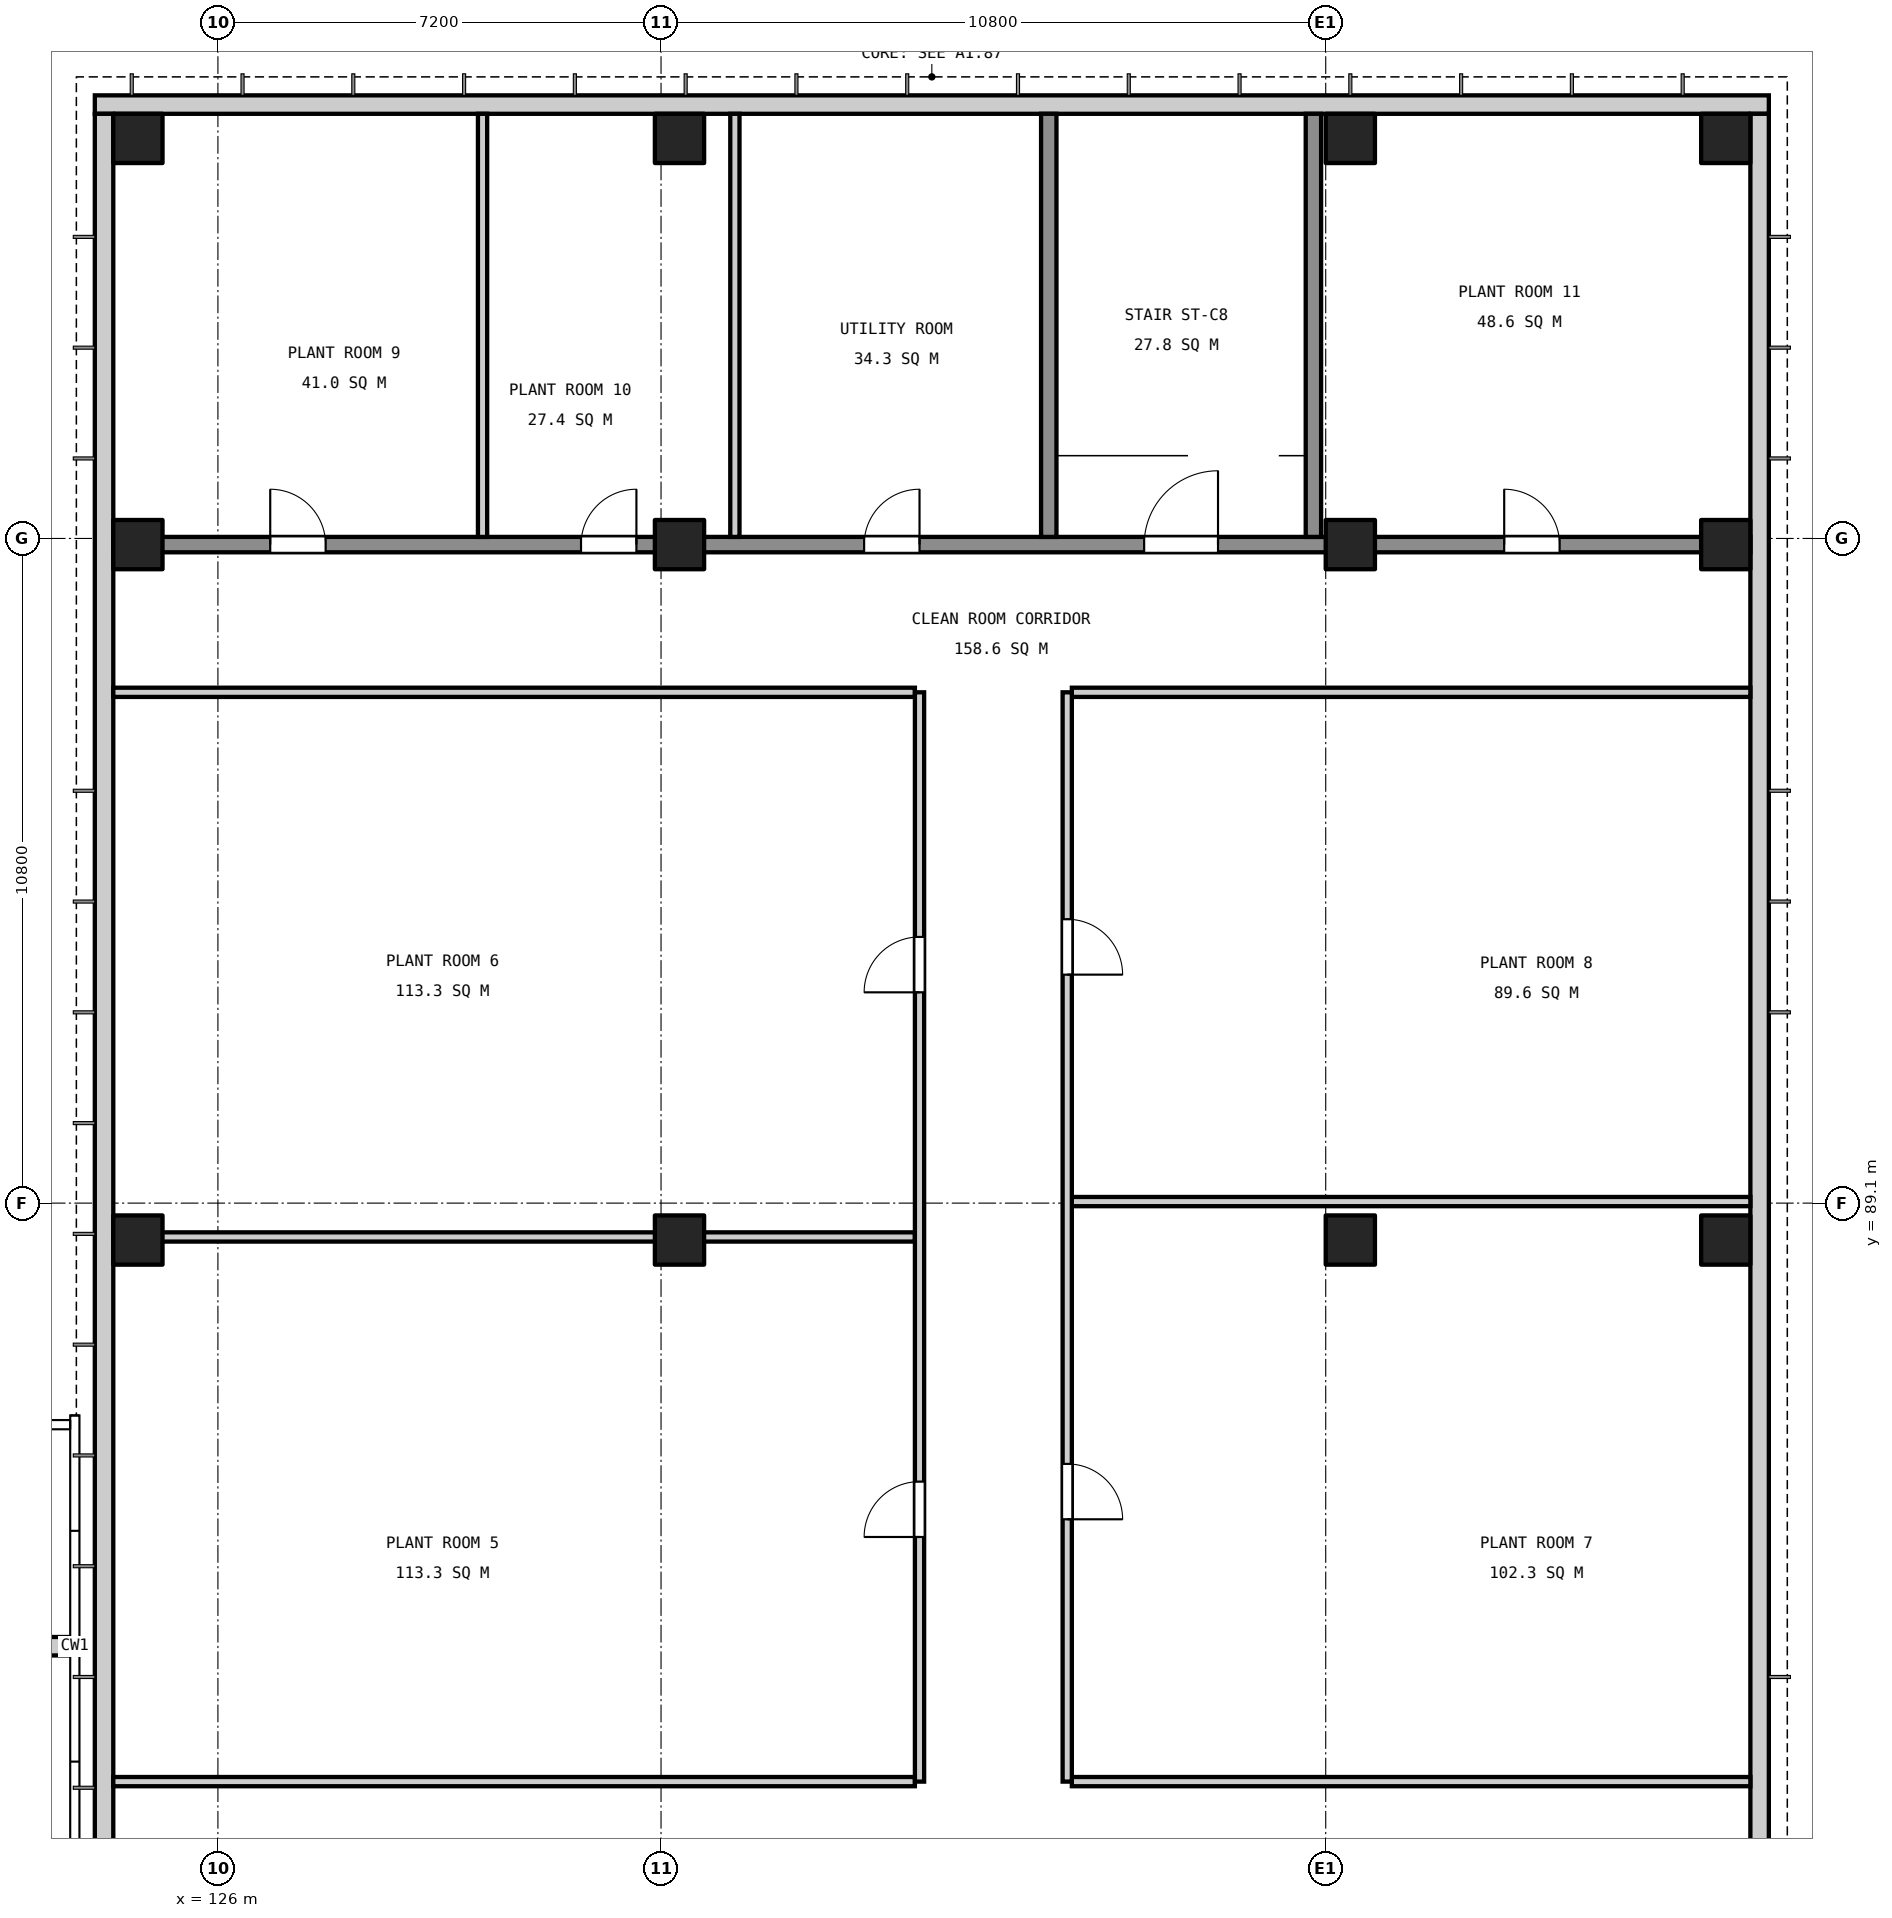
"""IFC4 building model, lengths in metres.
Left out: names, types, materials, properties, quantities, classifications, styles, units other than length and angle.
Written with IfcOpenShell. Run it as: python <this file> out.ifc"""

import sys

from ifc_helpers import new_model, si_unit, direction, frame, frame_2d, origin, origin_2d, place, context, subcontext, project, spatial, rectangle, extrude, element, fill, save


model = new_model("IFC4")
c1 = context("Model", 3, precision=1e-05, world=origin(), true_north=direction((0.0, 1.0)))
c2 = subcontext(c1, "Body", "Model", "MODEL_VIEW")
j1 = project(units=[si_unit("LENGTHUNIT", "METRE"), si_unit("PLANEANGLEUNIT", "RADIAN")], contexts=[c1])
p1 = place(None, origin())
s1 = spatial("IfcSite", under=j1, at=p1, CompositionType="ELEMENT")
p2 = place(p1, origin())
s2 = spatial("IfcBuilding", under=s1, at=p2, CompositionType="ELEMENT")
p3 = place(p2, frame((0.0, 0.0, 22.2)))
s3 = spatial("IfcBuildingStorey", under=s2, at=p3, CompositionType="ELEMENT", Elevation=22.2)
for number, where, z_axis, x_axis in (
    (1, (124.7, 88.5, 0.0), (0.0, 0.0, 1.0), (1.0, 0.0, 0.0)),
    (2, (124.7, 99.8, 0.0), (0.0, 0.0, 1.0), (1.0, 0.0, 0.0)),
    (3, (124.7, 106.4, 0.0), (0.0, 0.0, 1.0), (1.0, 0.0, 0.0)),
    (4, (133.5, 88.5, 0.0), (0.0, 0.0, 1.0), (1.0, 0.0, 0.0)),
    (5, (133.5, 99.8, 0.0), (0.0, 0.0, 1.0), (1.0, 0.0, 0.0)),
    (6, (133.5, 106.4, 0.0), (0.0, 0.0, 1.0), (1.0, 0.0, 0.0)),
    (7, (144.4, 88.5, 0.0), (0.0, 0.0, 1.0), (1.0, 0.0, 0.0)),
    (8, (144.4, 99.8, 0.0), (0.0, 0.0, 1.0), (1.0, 0.0, 0.0)),
    (9, (144.4, 106.4, 0.0), (0.0, 0.0, 1.0), (1.0, 0.0, 0.0)),
    (10, (150.5, 88.5, 0.0), (0.0, 0.0, 1.0), (1.0, 0.0, 0.0)),
    (11, (150.5, 99.8, 0.0), (0.0, 0.0, 1.0), (1.0, 0.0, 0.0)),
    (12, (150.5, 106.4, 0.0), (0.0, 0.0, 1.0), (1.0, 0.0, 0.0)),
):
    element("IfcColumn", number, at=place(p3, frame(where, z_axis=z_axis, x_axis=x_axis)), inside=s3, PredefinedType="COLUMN", context=c2, shape_type="SweptSolid", body=[
        extrude(rectangle(XDim=0.8, YDim=0.8, at=origin_2d()), origin(), (0.0, 0.0, 1.0), 4.8),
    ])
p4 = place(p3, frame((124.0, 106.95, 0.0), z_axis=(0.0, 0.0, 1.0), x_axis=(1.0, 0.0, 0.0)))
e13 = element("IfcWall", 13, at=p4, inside=s3, PredefinedType="SOLIDWALL", context=c2, shape_type="SweptSolid", body=[
    extrude(rectangle(XDim=27.2, YDim=0.3, at=frame_2d((13.6, 0.0))), origin(), (0.0, 0.0, 1.0), 4.35),
])
for number, where, z_axis, x_axis in (
    (14, (124.15, 70.3, 0.0), (0.0, 0.0, 1.0), (0.0, 1.0, 0.0)),
    (15, (151.05, 70.3, 0.0), (0.0, 0.0, 1.0), (0.0, 1.0, 0.0)),
):
    element("IfcWall", number, at=place(p3, frame(where, z_axis=z_axis, x_axis=x_axis)), inside=s3, PredefinedType="SOLIDWALL", context=c2, shape_type="SweptSolid", body=[
        extrude(rectangle(XDim=36.5, YDim=0.3, at=frame_2d((18.25, 0.0))), origin(), (0.0, 0.0, 1.0), 4.35),
    ])
p5 = place(p3, frame((124.3, 79.7, 0.0), z_axis=(0.0, 0.0, 1.0), x_axis=(1.0, 0.0, 0.0)))
e16 = element("IfcWall", 16, at=p5, inside=s3, PredefinedType="SOLIDWALL", context=c2, shape_type="SweptSolid", body=[
    extrude(rectangle(XDim=13.025, YDim=0.15, at=frame_2d((6.512, 0.0))), origin(), (0.0, 0.0, 1.0), 4.35),
])
p6 = place(p3, frame((139.875, 79.7, 0.0), z_axis=(0.0, 0.0, 1.0), x_axis=(1.0, 0.0, 0.0)))
e17 = element("IfcWall", 17, at=p6, inside=s3, PredefinedType="SOLIDWALL", context=c2, shape_type="SweptSolid", body=[
    extrude(rectangle(XDim=11.025, YDim=0.15, at=frame_2d((5.512, 0.0))), origin(), (0.0, 0.0, 1.0), 4.35),
])
p7 = place(p3, frame((124.3, 88.55, 0.0), z_axis=(0.0, 0.0, 1.0), x_axis=(1.0, 0.0, 0.0)))
e18 = element("IfcWall", 18, at=p7, inside=s3, PredefinedType="SOLIDWALL", context=c2, shape_type="SweptSolid", body=[
    extrude(rectangle(XDim=13.025, YDim=0.15, at=frame_2d((6.512, 0.0))), origin(), (0.0, 0.0, 1.0), 4.35),
])
p8 = place(p3, frame((139.875, 89.125, 0.0), z_axis=(0.0, 0.0, 1.0), x_axis=(1.0, 0.0, 0.0)))
e19 = element("IfcWall", 19, at=p8, inside=s3, PredefinedType="SOLIDWALL", context=c2, shape_type="SweptSolid", body=[
    extrude(rectangle(XDim=11.025, YDim=0.15, at=frame_2d((5.512, 0.0))), origin(), (0.0, 0.0, 1.0), 4.35),
])
p9 = place(p3, frame((124.3, 97.4, 0.0), z_axis=(0.0, 0.0, 1.0), x_axis=(1.0, 0.0, 0.0)))
e20 = element("IfcWall", 20, at=p9, inside=s3, PredefinedType="SOLIDWALL", context=c2, shape_type="SweptSolid", body=[
    extrude(rectangle(XDim=13.025, YDim=0.15, at=frame_2d((6.512, 0.0))), origin(), (0.0, 0.0, 1.0), 4.35),
])
p10 = place(p3, frame((139.875, 97.4, 0.0), z_axis=(0.0, 0.0, 1.0), x_axis=(1.0, 0.0, 0.0)))
e21 = element("IfcWall", 21, at=p10, inside=s3, PredefinedType="SOLIDWALL", context=c2, shape_type="SweptSolid", body=[
    extrude(rectangle(XDim=11.025, YDim=0.15, at=frame_2d((5.512, 0.0))), origin(), (0.0, 0.0, 1.0), 4.35),
])
p11 = place(p3, frame((124.3, 99.8, 0.0), z_axis=(0.0, 0.0, 1.0), x_axis=(1.0, 0.0, 0.0)))
e22 = element("IfcWall", 22, at=p11, inside=s3, PredefinedType="SOLIDWALL", context=c2, shape_type="SweptSolid", body=[
    extrude(rectangle(XDim=26.6, YDim=0.25, at=frame_2d((13.3, 0.0))), origin(), (0.0, 0.0, 1.0), 4.35),
])
p12 = place(p11, frame((2.55, 0.0, 0.0)))
e23 = element("IfcOpeningElement", 23, at=p12, cuts=e22, PredefinedType="OPENING", context=c2, shape_type="SweptSolid", body=[
    extrude(rectangle(XDim=0.9, YDim=2.1, at=frame_2d((0.45, 1.05))), frame((0.0, 0.135, 0.0), z_axis=(0.0, -1.0, 0.0), x_axis=(1.0, 0.0, 0.0)), (0.0, 0.0, 1.0), 0.27),
])
p13 = place(p11, frame((7.6, 0.0, 0.0)))
e24 = element("IfcOpeningElement", 24, at=p13, cuts=e22, PredefinedType="OPENING", context=c2, shape_type="SweptSolid", body=[
    extrude(rectangle(XDim=0.9, YDim=2.1, at=frame_2d((0.45, 1.05))), frame((0.0, 0.135, 0.0), z_axis=(0.0, -1.0, 0.0), x_axis=(1.0, 0.0, 0.0)), (0.0, 0.0, 1.0), 0.27),
])
p14 = place(p11, frame((22.6, 0.0, 0.0)))
e25 = element("IfcOpeningElement", 25, at=p14, cuts=e22, PredefinedType="OPENING", context=c2, shape_type="SweptSolid", body=[
    extrude(rectangle(XDim=0.9, YDim=2.1, at=frame_2d((0.45, 1.05))), frame((0.0, 0.135, 0.0), z_axis=(0.0, -1.0, 0.0), x_axis=(1.0, 0.0, 0.0)), (0.0, 0.0, 1.0), 0.27),
])
p15 = place(p11, frame((12.2, 0.0, 0.0)))
e26 = element("IfcOpeningElement", 26, at=p15, cuts=e22, PredefinedType="OPENING", context=c2, shape_type="SweptSolid", body=[
    extrude(rectangle(XDim=0.9, YDim=2.1, at=frame_2d((0.45, 1.05))), frame((0.0, 0.135, 0.0), z_axis=(0.0, -1.0, 0.0), x_axis=(1.0, 0.0, 0.0)), (0.0, 0.0, 1.0), 0.27),
])
p16 = place(p11, frame((16.75, 0.0, 0.0)))
e27 = element("IfcOpeningElement", 27, at=p16, cuts=e22, PredefinedType="OPENING", context=c2, shape_type="SweptSolid", body=[
    extrude(rectangle(XDim=1.2, YDim=2.1, at=frame_2d((0.6, 1.05))), frame((0.0, 0.135, 0.0), z_axis=(0.0, -1.0, 0.0), x_axis=(1.0, 0.0, 0.0)), (0.0, 0.0, 1.0), 0.27),
])
for number, where, z_axis, x_axis in (
    (28, (130.3, 99.925, 0.0), (0.0, 0.0, 1.0), (0.0, 1.0, 0.0)),
    (29, (134.4, 99.925, 0.0), (0.0, 0.0, 1.0), (0.0, 1.0, 0.0)),
):
    element("IfcWall", number, at=place(p3, frame(where, z_axis=z_axis, x_axis=x_axis)), inside=s3, PredefinedType="SOLIDWALL", context=c2, shape_type="SweptSolid", body=[
        extrude(rectangle(XDim=6.875, YDim=0.15, at=frame_2d((3.438, 0.0))), origin(), (0.0, 0.0, 1.0), 4.35),
    ])
p17 = place(p3, frame((137.4, 79.7, 0.0), z_axis=(0.0, 0.0, 1.0), x_axis=(0.0, 1.0, 0.0)))
e30 = element("IfcWall", 30, at=p17, inside=s3, PredefinedType="SOLIDWALL", context=c2, shape_type="SweptSolid", body=[
    extrude(rectangle(XDim=17.7, YDim=0.15, at=frame_2d((8.85, 0.0))), origin(), (0.0, 0.0, 1.0), 4.35),
])
p18 = place(p17, frame((3.975, 0.0, 0.0)))
e31 = element("IfcOpeningElement", 31, at=p18, cuts=e30, PredefinedType="OPENING", context=c2, shape_type="SweptSolid", body=[
    extrude(rectangle(XDim=0.9, YDim=2.1, at=frame_2d((0.45, 1.05))), frame((0.0, 0.085, 0.0), z_axis=(0.0, -1.0, 0.0), x_axis=(1.0, 0.0, 0.0)), (0.0, 0.0, 1.0), 0.17),
])
p19 = place(p17, frame((12.825, 0.0, 0.0)))
e32 = element("IfcOpeningElement", 32, at=p19, cuts=e30, PredefinedType="OPENING", context=c2, shape_type="SweptSolid", body=[
    extrude(rectangle(XDim=0.9, YDim=2.1, at=frame_2d((0.45, 1.05))), frame((0.0, 0.085, 0.0), z_axis=(0.0, -1.0, 0.0), x_axis=(1.0, 0.0, 0.0)), (0.0, 0.0, 1.0), 0.17),
])
p20 = place(p3, frame((139.5, 99.925, 0.0), z_axis=(0.0, 0.0, 1.0), x_axis=(0.0, 1.0, 0.0)))
e33 = element("IfcWall", 33, at=p20, inside=s3, PredefinedType="SOLIDWALL", context=c2, shape_type="SweptSolid", body=[
    extrude(rectangle(XDim=6.875, YDim=0.25, at=frame_2d((3.438, 0.0))), origin(), (0.0, 0.0, 1.0), 4.35),
])
p21 = place(p3, frame((139.8, 79.7, 0.0), z_axis=(0.0, 0.0, 1.0), x_axis=(0.0, 1.0, 0.0)))
e34 = element("IfcWall", 34, at=p21, inside=s3, PredefinedType="SOLIDWALL", context=c2, shape_type="SweptSolid", body=[
    extrude(rectangle(XDim=17.7, YDim=0.15, at=frame_2d((8.85, 0.0))), origin(), (0.0, 0.0, 1.0), 4.35),
])
p22 = place(p21, frame((4.262, 0.0, 0.0)))
e35 = element("IfcOpeningElement", 35, at=p22, cuts=e34, PredefinedType="OPENING", context=c2, shape_type="SweptSolid", body=[
    extrude(rectangle(XDim=0.9, YDim=2.1, at=frame_2d((0.45, 1.05))), frame((0.0, 0.085, 0.0), z_axis=(0.0, -1.0, 0.0), x_axis=(1.0, 0.0, 0.0)), (0.0, 0.0, 1.0), 0.17),
])
p23 = place(p21, frame((13.113, 0.0, 0.0)))
e36 = element("IfcOpeningElement", 36, at=p23, cuts=e34, PredefinedType="OPENING", context=c2, shape_type="SweptSolid", body=[
    extrude(rectangle(XDim=0.9, YDim=2.1, at=frame_2d((0.45, 1.05))), frame((0.0, 0.085, 0.0), z_axis=(0.0, -1.0, 0.0), x_axis=(1.0, 0.0, 0.0)), (0.0, 0.0, 1.0), 0.17),
])
p24 = place(p3, frame((143.8, 99.925, 0.0), z_axis=(0.0, 0.0, 1.0), x_axis=(0.0, 1.0, 0.0)))
e37 = element("IfcWall", 37, at=p24, inside=s3, PredefinedType="SOLIDWALL", context=c2, shape_type="SweptSolid", body=[
    extrude(rectangle(XDim=6.875, YDim=0.25, at=frame_2d((3.438, 0.0))), origin(), (0.0, 0.0, 1.0), 4.35),
])
p25 = place(p3, frame((123.6, 81.9, 0.0), z_axis=(0.0, 0.0, 1.0), x_axis=(-1.0, 0.0, 0.0)))
e38 = element("IfcWall", 38, at=p25, inside=s3, PredefinedType="STANDARD", context=c2, shape_type="SweptSolid", body=[
    extrude(rectangle(XDim=4.8, YDim=0.3, at=frame_2d((2.4, 0.0))), origin(), (0.0, 0.0, 1.0), 3.65),
])
p26 = place(p18, origin())
e39 = element("IfcDoor", 39, at=p26, inside=s3, OperationType="SINGLE_SWING_LEFT", PredefinedType="DOOR", context=c2, shape_type="SweptSolid", body=[
    extrude(rectangle(XDim=0.9, YDim=2.1, at=frame_2d((0.45, 1.05))), frame((0.0, 0.025, 0.0), z_axis=(0.0, -1.0, 0.0), x_axis=(1.0, 0.0, 0.0)), (0.0, 0.0, 1.0), 0.05),
])
fill(e31, e39)
p27 = place(p19, origin())
e40 = element("IfcDoor", 40, at=p27, inside=s3, OperationType="SINGLE_SWING_LEFT", PredefinedType="DOOR", context=c2, shape_type="SweptSolid", body=[
    extrude(rectangle(XDim=0.9, YDim=2.1, at=frame_2d((0.45, 1.05))), frame((0.0, 0.025, 0.0), z_axis=(0.0, -1.0, 0.0), x_axis=(1.0, 0.0, 0.0)), (0.0, 0.0, 1.0), 0.05),
])
fill(e32, e40)
p28 = place(p22, frame((0.9, 0.0, 0.0), z_axis=(0.0, 0.0, 1.0), x_axis=(-1.0, 0.0, 0.0)))
e41 = element("IfcDoor", 41, at=p28, inside=s3, OperationType="SINGLE_SWING_RIGHT", PredefinedType="DOOR", context=c2, shape_type="SweptSolid", body=[
    extrude(rectangle(XDim=0.9, YDim=2.1, at=frame_2d((0.45, 1.05))), frame((0.0, 0.025, 0.0), z_axis=(0.0, -1.0, 0.0), x_axis=(1.0, 0.0, 0.0)), (0.0, 0.0, 1.0), 0.05),
])
fill(e35, e41)
p29 = place(p23, frame((0.9, 0.0, 0.0), z_axis=(0.0, 0.0, 1.0), x_axis=(-1.0, 0.0, 0.0)))
e42 = element("IfcDoor", 42, at=p29, inside=s3, OperationType="SINGLE_SWING_RIGHT", PredefinedType="DOOR", context=c2, shape_type="SweptSolid", body=[
    extrude(rectangle(XDim=0.9, YDim=2.1, at=frame_2d((0.45, 1.05))), frame((0.0, 0.025, 0.0), z_axis=(0.0, -1.0, 0.0), x_axis=(1.0, 0.0, 0.0)), (0.0, 0.0, 1.0), 0.05),
])
fill(e36, e42)
p30 = place(p12, origin())
e43 = element("IfcDoor", 43, at=p30, inside=s3, OperationType="SINGLE_SWING_LEFT", PredefinedType="DOOR", context=c2, shape_type="SweptSolid", body=[
    extrude(rectangle(XDim=0.9, YDim=2.1, at=frame_2d((0.45, 1.05))), frame((0.0, 0.025, 0.0), z_axis=(0.0, -1.0, 0.0), x_axis=(1.0, 0.0, 0.0)), (0.0, 0.0, 1.0), 0.05),
])
fill(e23, e43)
p31 = place(p13, origin())
e44 = element("IfcDoor", 44, at=p31, inside=s3, OperationType="SINGLE_SWING_RIGHT", PredefinedType="DOOR", context=c2, shape_type="SweptSolid", body=[
    extrude(rectangle(XDim=0.9, YDim=2.1, at=frame_2d((0.45, 1.05))), frame((0.0, 0.025, 0.0), z_axis=(0.0, -1.0, 0.0), x_axis=(1.0, 0.0, 0.0)), (0.0, 0.0, 1.0), 0.05),
])
fill(e24, e44)
p32 = place(p14, origin())
e45 = element("IfcDoor", 45, at=p32, inside=s3, OperationType="SINGLE_SWING_LEFT", PredefinedType="DOOR", context=c2, shape_type="SweptSolid", body=[
    extrude(rectangle(XDim=0.9, YDim=2.1, at=frame_2d((0.45, 1.05))), frame((0.0, 0.025, 0.0), z_axis=(0.0, -1.0, 0.0), x_axis=(1.0, 0.0, 0.0)), (0.0, 0.0, 1.0), 0.05),
])
fill(e25, e45)
p33 = place(p15, origin())
e46 = element("IfcDoor", 46, at=p33, inside=s3, OperationType="SINGLE_SWING_RIGHT", PredefinedType="DOOR", context=c2, shape_type="SweptSolid", body=[
    extrude(rectangle(XDim=0.9, YDim=2.1, at=frame_2d((0.45, 1.05))), frame((0.0, 0.025, 0.0), z_axis=(0.0, -1.0, 0.0), x_axis=(1.0, 0.0, 0.0)), (0.0, 0.0, 1.0), 0.05),
])
fill(e26, e46)
p34 = place(p16, origin())
e47 = element("IfcDoor", 47, at=p34, inside=s3, OperationType="SINGLE_SWING_RIGHT", PredefinedType="DOOR", context=c2, shape_type="SweptSolid", body=[
    extrude(rectangle(XDim=1.2, YDim=2.1, at=frame_2d((0.6, 1.05))), frame((0.0, 0.025, 0.0), z_axis=(0.0, -1.0, 0.0), x_axis=(1.0, 0.0, 0.0)), (0.0, 0.0, 1.0), 0.05),
])
fill(e27, e47)
save(model, sys.argv[1])
